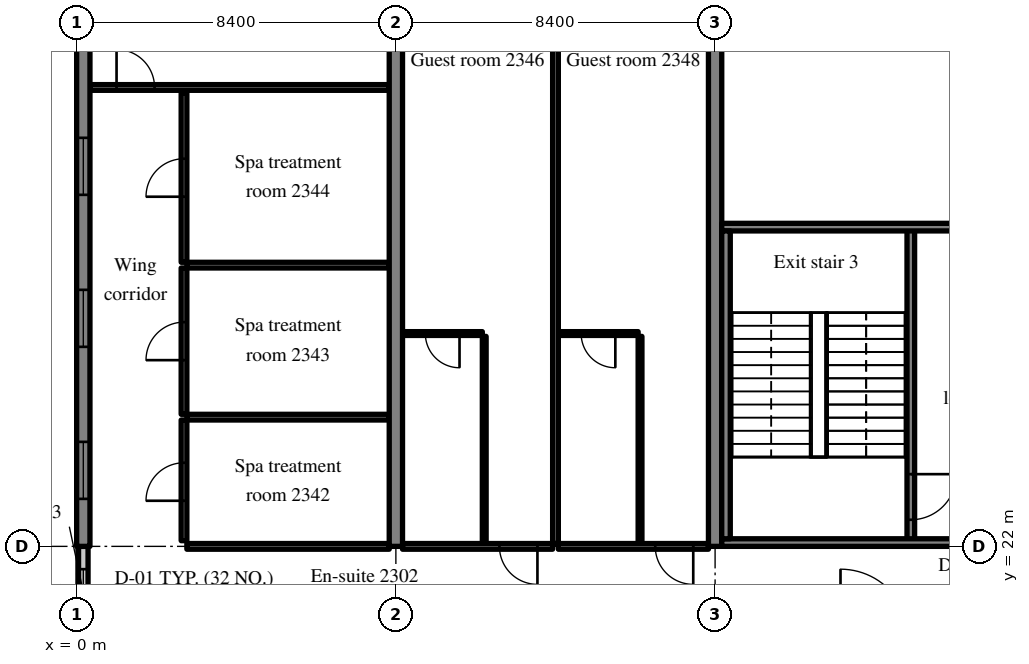
"""IFC4 building model, lengths in metres.
Left out: names, types, materials, properties, quantities, classifications, styles, units other than length and angle.
Written with IfcOpenShell. Run it as: python <this file> out.ifc"""

import sys

from ifc_helpers import new_model, si_unit, direction, frame, frame_2d, origin, place, context, subcontext, project, spatial, rectangle, extrude, source, transform, mapped, element, fill, save


model = new_model("IFC4")
c1 = context("Model", 3, precision=1e-05, world=origin(), true_north=direction((0.0, 1.0)))
c2 = subcontext(c1, "Body", "Model", "MODEL_VIEW")
j1 = project(units=[si_unit("LENGTHUNIT", "METRE"), si_unit("PLANEANGLEUNIT", "RADIAN")], contexts=[c1])
p1 = place(None, origin())
s1 = spatial("IfcSite", under=j1, at=p1, CompositionType="ELEMENT")
p2 = place(p1, origin())
s2 = spatial("IfcBuilding", under=s1, at=p2, CompositionType="ELEMENT")
p3 = place(p2, frame((0.0, 0.0, 99.0)))
s3 = spatial("IfcBuildingStorey", under=s2, at=p3, CompositionType="ELEMENT", Elevation=99.0)
m1 = source(origin(), c2, "Body", "SweptSolid", [
    extrude(rectangle(XDim=16.0, YDim=0.35, at=frame_2d((8.0, 0.0))), origin(), (0.0, 0.0, 1.0), 3.52),
])
p4 = place(p3, frame((0.175, 22.0, 0.0), z_axis=(0.0, 0.0, 1.0), x_axis=(0.0, 1.0, 0.0)))
e1 = element("IfcWall", 1, at=p4, inside=s3, PredefinedType="SHEAR", context=c2, shape_type="MappedRepresentation", body=[
    mapped(m1, transform((0.0, 0.0, 0.0), scale=1.0)),
])
m2 = source(origin(), c2, "Body", "SweptSolid", [
    extrude(rectangle(XDim=1.5, YDim=1.5, at=frame_2d((0.75, 0.75))), frame((0.0, 0.185, 0.0), z_axis=(0.0, -1.0, 0.0), x_axis=(1.0, 0.0, 0.0)), (0.0, 0.0, 1.0), 0.37),
])
p5 = place(p4, frame((1.25, 0.0, 0.9)))
e2 = element("IfcOpeningElement", 2, at=p5, cuts=e1, PredefinedType="OPENING", context=c2, shape_type="MappedRepresentation", body=[
    mapped(m2, transform((0.0, 0.0, 0.0), scale=1.0)),
])
p6 = place(p4, frame((5.25, 0.0, 0.9)))
e3 = element("IfcOpeningElement", 3, at=p6, cuts=e1, PredefinedType="OPENING", context=c2, shape_type="MappedRepresentation", body=[
    mapped(m2, transform((0.0, 0.0, 0.0), scale=1.0)),
])
p7 = place(p4, frame((9.25, 0.0, 0.9)))
e4 = element("IfcOpeningElement", 4, at=p7, cuts=e1, PredefinedType="OPENING", context=c2, shape_type="MappedRepresentation", body=[
    mapped(m2, transform((0.0, 0.0, 0.0), scale=1.0)),
])
p8 = place(p4, frame((13.25, 0.0, 0.9)))
e5 = element("IfcOpeningElement", 5, at=p8, cuts=e1, PredefinedType="OPENING", context=c2, shape_type="MappedRepresentation", body=[
    mapped(m2, transform((0.0, 0.0, 0.0), scale=1.0)),
])
m3 = source(origin(), c2, "Body", "SweptSolid", [
    extrude(rectangle(XDim=20.0, YDim=0.35, at=frame_2d((10.0, 0.0))), origin(), (0.0, 0.0, 1.0), 3.52),
])
for number, where, z_axis, x_axis in (
    (6, (8.4, 22.0, 0.0), (0.0, 0.0, 1.0), (0.0, 1.0, 0.0)),
    (7, (16.8, 22.0, 0.0), (0.0, 0.0, 1.0), (0.0, 1.0, 0.0)),
):
    element("IfcWall", number, at=place(p3, frame(where, z_axis=z_axis, x_axis=x_axis)), inside=s3, PredefinedType="SHEAR", context=c2, shape_type="MappedRepresentation", body=[
        mapped(m3, transform((0.0, 0.0, 0.0), scale=1.0)),
    ])
m4 = source(origin(), c2, "Body", "SweptSolid", [
    extrude(rectangle(XDim=2.4, YDim=0.25, at=frame_2d((1.2, 0.0))), origin(), (0.0, 0.0, 1.0), 2.62),
])
p9 = place(p3, frame((0.175, 19.6, 0.0), z_axis=(0.0, 0.0, 1.0), x_axis=(0.0, 1.0, 0.0)))
e8 = element("IfcWall", 8, at=p9, inside=s3, PredefinedType="SOLIDWALL", context=c2, shape_type="MappedRepresentation", body=[
    mapped(m4, transform((0.0, 0.0, 0.0), scale=1.0)),
])
m5 = source(origin(), c2, "Body", "SweptSolid", [
    extrude(rectangle(XDim=1.2, YDim=1.5, at=frame_2d((0.6, 0.75))), frame((0.0, 0.135, 0.0), z_axis=(0.0, -1.0, 0.0), x_axis=(1.0, 0.0, 0.0)), (0.0, 0.0, 1.0), 0.27),
])
p10 = place(p9, frame((0.6, 0.0, 0.9)))
e9 = element("IfcOpeningElement", 9, at=p10, cuts=e8, PredefinedType="OPENING", context=c2, shape_type="MappedRepresentation", body=[
    mapped(m5, transform((0.0, 0.0, 0.0), scale=1.0)),
])
m6 = source(origin(), c2, "Body", "SweptSolid", [
    extrude(rectangle(XDim=8.3, YDim=0.2, at=frame_2d((4.15, 0.0))), origin(), (0.0, 0.0, 1.0), 3.52),
])
p11 = place(p3, frame((21.95, 22.1, 0.0), z_axis=(0.0, 0.0, 1.0), x_axis=(0.0, 1.0, 0.0)))
e10 = element("IfcWall", 10, at=p11, inside=s3, PredefinedType="SOLIDWALL", context=c2, shape_type="MappedRepresentation", body=[
    mapped(m6, transform((0.0, 0.0, 0.0), scale=1.0)),
])
m7 = source(origin(), c2, "Body", "SweptSolid", [
    extrude(rectangle(XDim=1.2, YDim=2.1, at=frame_2d((0.6, 1.05))), frame((0.0, 0.11, 0.0), z_axis=(0.0, -1.0, 0.0), x_axis=(1.0, 0.0, 0.0)), (0.0, 0.0, 1.0), 0.22),
])
p12 = place(p11, frame((0.6, 0.0, 0.0)))
e11 = element("IfcOpeningElement", 11, at=p12, cuts=e10, PredefinedType="OPENING", context=c2, shape_type="MappedRepresentation", body=[
    mapped(m7, transform((0.0, 0.0, 0.0), scale=1.0)),
])
m8 = source(origin(), c2, "Body", "SweptSolid", [
    extrude(rectangle(XDim=8.225, YDim=0.2, at=frame_2d((4.112, 0.0))), origin(), (0.0, 0.0, 1.0), 3.52),
])
p13 = place(p3, frame((16.975, 22.1, 0.0), z_axis=(0.0, 0.0, 1.0), x_axis=(1.0, 0.0, 0.0)))
e12 = element("IfcWall", 12, at=p13, inside=s3, PredefinedType="SOLIDWALL", context=c2, shape_type="MappedRepresentation", body=[
    mapped(m8, transform((0.0, 0.0, 0.0), scale=1.0)),
])
p14 = place(p13, frame((6.025, 0.0, 0.0)))
e13 = element("IfcOpeningElement", 13, at=p14, cuts=e12, PredefinedType="OPENING", context=c2, shape_type="MappedRepresentation", body=[
    mapped(m7, transform((0.0, 0.0, 0.0), scale=1.0)),
])
p15 = place(p3, frame((16.975, 30.4, 0.0), z_axis=(0.0, 0.0, 1.0), x_axis=(1.0, 0.0, 0.0)))
e14 = element("IfcWall", 14, at=p15, inside=s3, PredefinedType="SOLIDWALL", context=c2, shape_type="MappedRepresentation", body=[
    mapped(m8, transform((0.0, 0.0, 0.0), scale=1.0)),
])
m9 = source(origin(), c2, "Body", "SweptSolid", [
    extrude(rectangle(XDim=1.0, YDim=2.1, at=frame_2d((0.5, 1.05))), frame((0.0, 0.11, 0.0), z_axis=(0.0, -1.0, 0.0), x_axis=(1.0, 0.0, 0.0)), (0.0, 0.0, 1.0), 0.22),
])
p16 = place(p15, frame((6.125, 0.0, 0.0)))
e15 = element("IfcOpeningElement", 15, at=p16, cuts=e14, PredefinedType="OPENING", context=c2, shape_type="MappedRepresentation", body=[
    mapped(m9, transform((0.0, 0.0, 0.0), scale=1.0)),
])
m10 = source(origin(), c2, "Body", "SweptSolid", [
    extrude(rectangle(XDim=8.1, YDim=0.225, at=frame_2d((4.05, 0.0))), origin(), (0.0, 0.0, 1.0), 3.52),
])
p17 = place(p3, frame((17.087, 22.2, 0.0), z_axis=(0.0, 0.0, 1.0), x_axis=(0.0, 1.0, 0.0)))
e16 = element("IfcWall", 16, at=p17, inside=s3, PredefinedType="SOLIDWALL", context=c2, shape_type="MappedRepresentation", body=[
    mapped(m10, transform((0.0, 0.0, 0.0), scale=1.0)),
])
m11 = source(origin(), c2, "Body", "SweptSolid", [
    extrude(rectangle(XDim=5.325, YDim=0.15, at=frame_2d((2.663, 0.0))), origin(), (0.0, 0.0, 1.0), 2.82),
])
p18 = place(p3, frame((2.9, 22.0, 0.0), z_axis=(0.0, 0.0, 1.0), x_axis=(1.0, 0.0, 0.0)))
e17 = element("IfcWall", 17, at=p18, inside=s3, PredefinedType="PARTITIONING", context=c2, shape_type="MappedRepresentation", body=[
    mapped(m11, transform((0.0, 0.0, 0.0), scale=1.0)),
])
m12 = source(origin(), c2, "Body", "SweptSolid", [
    extrude(rectangle(XDim=3.175, YDim=0.15, at=frame_2d((1.587, 0.0))), origin(), (0.0, 0.0, 1.0), 3.52),
])
p19 = place(p3, frame((2.825, 22.15, 0.0), z_axis=(0.0, 0.0, 1.0), x_axis=(0.0, 1.0, 0.0)))
e18 = element("IfcWall", 18, at=p19, inside=s3, PredefinedType="PARTITIONING", context=c2, shape_type="MappedRepresentation", body=[
    mapped(m12, transform((0.0, 0.0, 0.0), scale=1.0)),
])
m13 = source(origin(), c2, "Body", "SweptSolid", [
    extrude(rectangle(XDim=1.0, YDim=2.1, at=frame_2d((0.5, 1.05))), frame((0.0, 0.085, 0.0), z_axis=(0.0, -1.0, 0.0), x_axis=(1.0, 0.0, 0.0)), (0.0, 0.0, 1.0), 0.17),
])
p20 = place(p19, frame((1.05, 0.0, 0.0)))
e19 = element("IfcOpeningElement", 19, at=p20, cuts=e18, PredefinedType="OPENING", context=c2, shape_type="MappedRepresentation", body=[
    mapped(m13, transform((0.0, 0.0, 0.0), scale=1.0)),
])
m14 = source(origin(), c2, "Body", "SweptSolid", [
    extrude(rectangle(XDim=5.325, YDim=0.15, at=frame_2d((2.663, 0.0))), origin(), (0.0, 0.0, 1.0), 3.52),
])
p21 = place(p3, frame((2.9, 25.4, 0.0), z_axis=(0.0, 0.0, 1.0), x_axis=(1.0, 0.0, 0.0)))
e20 = element("IfcWall", 20, at=p21, inside=s3, PredefinedType="PARTITIONING", context=c2, shape_type="MappedRepresentation", body=[
    mapped(m14, transform((0.0, 0.0, 0.0), scale=1.0)),
])
m15 = source(origin(), c2, "Body", "SweptSolid", [
    extrude(rectangle(XDim=3.85, YDim=0.15, at=frame_2d((1.925, 0.0))), origin(), (0.0, 0.0, 1.0), 3.52),
])
p22 = place(p3, frame((2.825, 25.475, 0.0), z_axis=(0.0, 0.0, 1.0), x_axis=(0.0, 1.0, 0.0)))
e21 = element("IfcWall", 21, at=p22, inside=s3, PredefinedType="PARTITIONING", context=c2, shape_type="MappedRepresentation", body=[
    mapped(m15, transform((0.0, 0.0, 0.0), scale=1.0)),
])
p23 = place(p22, frame((1.425, 0.0, 0.0)))
e22 = element("IfcOpeningElement", 22, at=p23, cuts=e21, PredefinedType="OPENING", context=c2, shape_type="MappedRepresentation", body=[
    mapped(m13, transform((0.0, 0.0, 0.0), scale=1.0)),
])
p24 = place(p3, frame((2.9, 29.4, 0.0), z_axis=(0.0, 0.0, 1.0), x_axis=(1.0, 0.0, 0.0)))
e23 = element("IfcWall", 23, at=p24, inside=s3, PredefinedType="PARTITIONING", context=c2, shape_type="MappedRepresentation", body=[
    mapped(m14, transform((0.0, 0.0, 0.0), scale=1.0)),
])
m16 = source(origin(), c2, "Body", "SweptSolid", [
    extrude(rectangle(XDim=4.45, YDim=0.15, at=frame_2d((2.225, 0.0))), origin(), (0.0, 0.0, 1.0), 3.52),
])
p25 = place(p3, frame((2.825, 29.475, 0.0), z_axis=(0.0, 0.0, 1.0), x_axis=(0.0, 1.0, 0.0)))
e24 = element("IfcWall", 24, at=p25, inside=s3, PredefinedType="PARTITIONING", context=c2, shape_type="MappedRepresentation", body=[
    mapped(m16, transform((0.0, 0.0, 0.0), scale=1.0)),
])
p26 = place(p25, frame((1.725, 0.0, 0.0)))
e25 = element("IfcOpeningElement", 25, at=p26, cuts=e24, PredefinedType="OPENING", context=c2, shape_type="MappedRepresentation", body=[
    mapped(m13, transform((0.0, 0.0, 0.0), scale=1.0)),
])
m17 = source(origin(), c2, "Body", "SweptSolid", [
    extrude(rectangle(XDim=7.875, YDim=0.15, at=frame_2d((3.938, 0.0))), origin(), (0.0, 0.0, 1.0), 3.52),
])
p27 = place(p3, frame((0.35, 34.075, 0.0), z_axis=(0.0, 0.0, 1.0), x_axis=(1.0, 0.0, 0.0)))
e26 = element("IfcWall", 26, at=p27, inside=s3, PredefinedType="PARTITIONING", context=c2, shape_type="MappedRepresentation", body=[
    mapped(m17, transform((0.0, 0.0, 0.0), scale=1.0)),
])
p28 = place(p27, frame((0.7, 0.0, 0.0)))
e27 = element("IfcOpeningElement", 27, at=p28, cuts=e26, PredefinedType="OPENING", context=c2, shape_type="MappedRepresentation", body=[
    mapped(m13, transform((0.0, 0.0, 0.0), scale=1.0)),
])
m18 = source(origin(), c2, "Body", "SweptSolid", [
    extrude(rectangle(XDim=5.45, YDim=0.1, at=frame_2d((2.725, 0.0))), origin(), (0.0, 0.0, 1.0), 3.52),
])
p29 = place(p3, frame((10.725, 22.075, 0.0), z_axis=(0.0, 0.0, 1.0), x_axis=(0.0, 1.0, 0.0)))
e28 = element("IfcWall", 28, at=p29, inside=s3, PredefinedType="PARTITIONING", context=c2, shape_type="MappedRepresentation", body=[
    mapped(m18, transform((0.0, 0.0, 0.0), scale=1.0)),
])
m19 = source(origin(), c2, "Body", "SweptSolid", [
    extrude(rectangle(XDim=2.1, YDim=0.1, at=frame_2d((1.05, 0.0))), origin(), (0.0, 0.0, 1.0), 3.52),
])
p30 = place(p3, frame((8.575, 27.6, 0.0), z_axis=(0.0, 0.0, 1.0), x_axis=(1.0, 0.0, 0.0)))
e29 = element("IfcWall", 29, at=p30, inside=s3, PredefinedType="PARTITIONING", context=c2, shape_type="MappedRepresentation", body=[
    mapped(m19, transform((0.0, 0.0, 0.0), scale=1.0)),
])
m20 = source(origin(), c2, "Body", "SweptSolid", [
    extrude(rectangle(XDim=0.9, YDim=2.1, at=frame_2d((0.45, 1.05))), frame((0.0, 0.06, 0.0), z_axis=(0.0, -1.0, 0.0), x_axis=(1.0, 0.0, 0.0)), (0.0, 0.0, 1.0), 0.12),
])
p31 = place(p30, frame((0.6, 0.0, 0.0)))
e30 = element("IfcOpeningElement", 30, at=p31, cuts=e29, PredefinedType="OPENING", context=c2, shape_type="MappedRepresentation", body=[
    mapped(m20, transform((0.0, 0.0, 0.0), scale=1.0)),
])
m21 = source(origin(), c2, "Body", "SweptSolid", [
    extrude(rectangle(XDim=3.95, YDim=0.15, at=frame_2d((1.975, 0.0))), origin(), (0.0, 0.0, 1.0), 2.82),
])
p32 = place(p3, frame((8.575, 22.0, 0.0), z_axis=(0.0, 0.0, 1.0), x_axis=(1.0, 0.0, 0.0)))
e31 = element("IfcWall", 31, at=p32, inside=s3, PredefinedType="PARTITIONING", context=c2, shape_type="MappedRepresentation", body=[
    mapped(m21, transform((0.0, 0.0, 0.0), scale=1.0)),
])
p33 = place(p32, frame((2.55, 0.0, 0.0)))
e32 = element("IfcOpeningElement", 32, at=p33, cuts=e31, PredefinedType="OPENING", context=c2, shape_type="MappedRepresentation", body=[
    mapped(m13, transform((0.0, 0.0, 0.0), scale=1.0)),
])
p34 = place(p3, frame((14.825, 22.075, 0.0), z_axis=(0.0, 0.0, 1.0), x_axis=(0.0, 1.0, 0.0)))
e33 = element("IfcWall", 33, at=p34, inside=s3, PredefinedType="PARTITIONING", context=c2, shape_type="MappedRepresentation", body=[
    mapped(m18, transform((0.0, 0.0, 0.0), scale=1.0)),
])
m22 = source(origin(), c2, "Body", "SweptSolid", [
    extrude(rectangle(XDim=2.1, YDim=0.1, at=frame_2d((1.05, 0.0))), origin(), (0.0, 0.0, 1.0), 3.52),
])
p35 = place(p3, frame((12.675, 27.6, 0.0), z_axis=(0.0, 0.0, 1.0), x_axis=(1.0, 0.0, 0.0)))
e34 = element("IfcWall", 34, at=p35, inside=s3, PredefinedType="PARTITIONING", context=c2, shape_type="MappedRepresentation", body=[
    mapped(m22, transform((0.0, 0.0, 0.0), scale=1.0)),
])
p36 = place(p35, frame((0.6, 0.0, 0.0)))
e35 = element("IfcOpeningElement", 35, at=p36, cuts=e34, PredefinedType="OPENING", context=c2, shape_type="MappedRepresentation", body=[
    mapped(m20, transform((0.0, 0.0, 0.0), scale=1.0)),
])
p37 = place(p3, frame((12.675, 22.0, 0.0), z_axis=(0.0, 0.0, 1.0), x_axis=(1.0, 0.0, 0.0)))
e36 = element("IfcWall", 36, at=p37, inside=s3, PredefinedType="PARTITIONING", context=c2, shape_type="MappedRepresentation", body=[
    mapped(m21, transform((0.0, 0.0, 0.0), scale=1.0)),
])
p38 = place(p37, frame((2.55, 0.0, 0.0)))
e37 = element("IfcOpeningElement", 37, at=p38, cuts=e36, PredefinedType="OPENING", context=c2, shape_type="MappedRepresentation", body=[
    mapped(m13, transform((0.0, 0.0, 0.0), scale=1.0)),
])
m23 = source(origin(), c2, "Body", "SweptSolid", [
    extrude(rectangle(XDim=19.225, YDim=0.15, at=frame_2d((9.613, 0.0))), origin(), (0.0, 0.0, 1.0), 3.52),
])
p39 = place(p3, frame((12.6, 22.075, 0.0), z_axis=(0.0, 0.0, 1.0), x_axis=(0.0, 1.0, 0.0)))
e38 = element("IfcWall", 38, at=p39, inside=s3, PredefinedType="PARTITIONING", context=c2, shape_type="MappedRepresentation", body=[
    mapped(m23, transform((0.0, 0.0, 0.0), scale=1.0)),
])
m24 = source(origin(), c2, "Body", "SweptSolid", [
    extrude(rectangle(XDim=1.5, YDim=1.5, at=frame_2d((0.75, 0.75))), frame((0.0, 0.03, 0.0), z_axis=(0.0, -1.0, 0.0), x_axis=(1.0, 0.0, 0.0)), (0.0, 0.0, 1.0), 0.06),
])
p40 = place(p5, origin())
e39 = element("IfcWindow", 39, at=p40, inside=s3, PartitioningType="SINGLE_PANEL", PredefinedType="WINDOW", context=c2, shape_type="MappedRepresentation", body=[
    mapped(m24, transform((0.0, 0.0, 0.0), scale=1.0)),
])
fill(e2, e39)
p41 = place(p6, origin())
e40 = element("IfcWindow", 40, at=p41, inside=s3, PartitioningType="SINGLE_PANEL", PredefinedType="WINDOW", context=c2, shape_type="MappedRepresentation", body=[
    mapped(m24, transform((0.0, 0.0, 0.0), scale=1.0)),
])
fill(e3, e40)
p42 = place(p7, origin())
e41 = element("IfcWindow", 41, at=p42, inside=s3, PartitioningType="SINGLE_PANEL", PredefinedType="WINDOW", context=c2, shape_type="MappedRepresentation", body=[
    mapped(m24, transform((0.0, 0.0, 0.0), scale=1.0)),
])
fill(e4, e41)
m25 = source(origin(), c2, "Body", "SweptSolid", [
    extrude(rectangle(XDim=1.2, YDim=1.5, at=frame_2d((0.6, 0.75))), frame((0.0, 0.03, 0.0), z_axis=(0.0, -1.0, 0.0), x_axis=(1.0, 0.0, 0.0)), (0.0, 0.0, 1.0), 0.06),
])
p43 = place(p10, origin())
e42 = element("IfcWindow", 42, at=p43, inside=s3, PartitioningType="SINGLE_PANEL", PredefinedType="WINDOW", context=c2, shape_type="MappedRepresentation", body=[
    mapped(m25, transform((0.0, 0.0, 0.0), scale=1.0)),
])
fill(e9, e42)
m26 = source(origin(), c2, "Body", "SweptSolid", [
    extrude(rectangle(XDim=1.2, YDim=2.1, at=frame_2d((0.6, 1.05))), frame((0.0, 0.025, 0.0), z_axis=(0.0, -1.0, 0.0), x_axis=(1.0, 0.0, 0.0)), (0.0, 0.0, 1.0), 0.05),
])
p44 = place(p12, origin())
e43 = element("IfcDoor", 43, at=p44, inside=s3, OperationType="SINGLE_SWING_RIGHT", PredefinedType="DOOR", context=c2, shape_type="MappedRepresentation", body=[
    mapped(m26, transform((0.0, 0.0, 0.0), scale=1.0)),
])
fill(e11, e43)
m27 = source(origin(), c2, "Body", "SweptSolid", [
    extrude(rectangle(XDim=1.0, YDim=2.1, at=frame_2d((0.5, 1.05))), frame((0.0, 0.025, 0.0), z_axis=(0.0, -1.0, 0.0), x_axis=(1.0, 0.0, 0.0)), (0.0, 0.0, 1.0), 0.05),
])
p45 = place(p20, origin())
e44 = element("IfcDoor", 44, at=p45, inside=s3, OperationType="SINGLE_SWING_LEFT", PredefinedType="DOOR", context=c2, shape_type="MappedRepresentation", body=[
    mapped(m27, transform((0.0, 0.0, 0.0), scale=1.0)),
])
fill(e19, e44)
p46 = place(p23, origin())
e45 = element("IfcDoor", 45, at=p46, inside=s3, OperationType="SINGLE_SWING_LEFT", PredefinedType="DOOR", context=c2, shape_type="MappedRepresentation", body=[
    mapped(m27, transform((0.0, 0.0, 0.0), scale=1.0)),
])
fill(e22, e45)
p47 = place(p26, origin())
e46 = element("IfcDoor", 46, at=p47, inside=s3, OperationType="SINGLE_SWING_LEFT", PredefinedType="DOOR", context=c2, shape_type="MappedRepresentation", body=[
    mapped(m27, transform((0.0, 0.0, 0.0), scale=1.0)),
])
fill(e25, e46)
p48 = place(p28, origin())
e47 = element("IfcDoor", 47, at=p48, inside=s3, OperationType="SINGLE_SWING_LEFT", PredefinedType="DOOR", context=c2, shape_type="MappedRepresentation", body=[
    mapped(m27, transform((0.0, 0.0, 0.0), scale=1.0)),
])
fill(e27, e47)
m28 = source(origin(), c2, "Body", "SweptSolid", [
    extrude(rectangle(XDim=0.9, YDim=2.1, at=frame_2d((0.45, 1.05))), frame((0.0, 0.025, 0.0), z_axis=(0.0, -1.0, 0.0), x_axis=(1.0, 0.0, 0.0)), (0.0, 0.0, 1.0), 0.05),
])
p49 = place(p31, origin())
e48 = element("IfcDoor", 48, at=p49, inside=s3, OperationType="SINGLE_SWING_RIGHT", PredefinedType="DOOR", context=c2, shape_type="MappedRepresentation", body=[
    mapped(m28, transform((0.0, 0.0, 0.0), scale=1.0)),
])
fill(e30, e48)
p50 = place(p33, origin())
e49 = element("IfcDoor", 49, at=p50, inside=s3, OperationType="SINGLE_SWING_RIGHT", PredefinedType="DOOR", context=c2, shape_type="MappedRepresentation", body=[
    mapped(m27, transform((0.0, 0.0, 0.0), scale=1.0)),
])
fill(e32, e49)
p51 = place(p36, origin())
e50 = element("IfcDoor", 50, at=p51, inside=s3, OperationType="SINGLE_SWING_RIGHT", PredefinedType="DOOR", context=c2, shape_type="MappedRepresentation", body=[
    mapped(m28, transform((0.0, 0.0, 0.0), scale=1.0)),
])
fill(e35, e50)
p52 = place(p38, origin())
e51 = element("IfcDoor", 51, at=p52, inside=s3, OperationType="SINGLE_SWING_RIGHT", PredefinedType="DOOR", context=c2, shape_type="MappedRepresentation", body=[
    mapped(m27, transform((0.0, 0.0, 0.0), scale=1.0)),
])
fill(e37, e51)
save(model, sys.argv[1])
